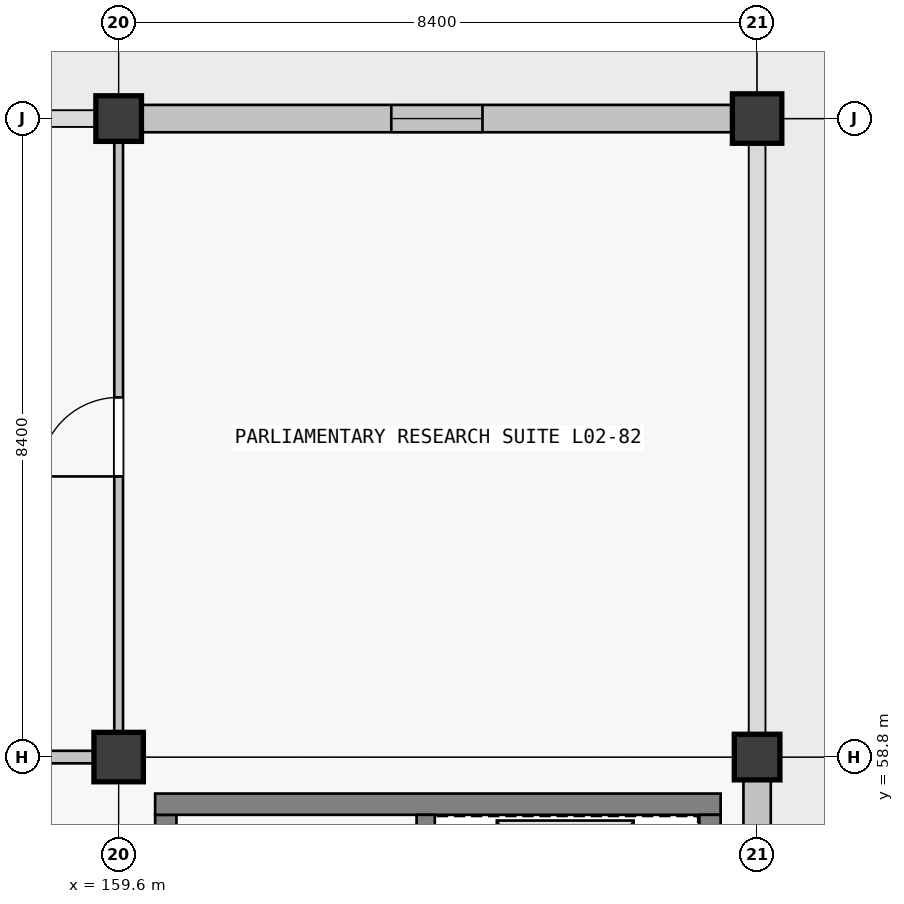
"""IFC4 building model, lengths in metres.
Left out: names, types, materials, properties, quantities, classifications, styles, units other than length and angle.
Written with IfcOpenShell. Run it as: python <this file> out.ifc"""

import sys

from ifc_helpers import new_model, si_unit, direction, frame, frame_2d, origin, origin_2d, place, context, subcontext, project, spatial, rectangle, extrude, element, fill, save


model = new_model("IFC4")
c1 = context("Model", 3, precision=1e-05, world=origin(), true_north=direction((0.0, 1.0)))
c2 = subcontext(c1, "Body", "Model", "MODEL_VIEW")
j1 = project(units=[si_unit("LENGTHUNIT", "METRE"), si_unit("PLANEANGLEUNIT", "RADIAN")], contexts=[c1])
p1 = place(None, origin())
s1 = spatial("IfcSite", under=j1, at=p1, CompositionType="ELEMENT")
p2 = place(p1, origin())
s2 = spatial("IfcBuilding", under=s1, at=p2, CompositionType="ELEMENT")
p3 = place(p2, frame((0.0, 0.0, 10.26)))
s3 = spatial("IfcBuildingStorey", under=s2, at=p3, CompositionType="ELEMENT", Elevation=10.26)
p4 = place(p3, frame((159.6, 58.8, 0.0), z_axis=(0.0, 0.0, 1.0), x_axis=(1.0, 0.0, 0.0)))
e1 = element("IfcColumn", 1, at=p4, inside=s3, PredefinedType="COLUMN", context=c2, shape_type="SweptSolid", body=[
    extrude(rectangle(XDim=0.65, YDim=0.65, at=origin_2d()), origin(), (0.0, 0.0, 1.0), 4.5),
])
for number, where, z_axis, x_axis in (
    (2, (159.6, 67.2, 0.0), (0.0, 0.0, 1.0), (1.0, 0.0, 0.0)),
    (3, (168.0, 58.8, 0.0), (0.0, 0.0, 1.0), (1.0, 0.0, 0.0)),
):
    element("IfcColumn", number, at=place(p3, frame(where, z_axis=z_axis, x_axis=x_axis)), inside=s3, PredefinedType="COLUMN", context=c2, shape_type="SweptSolid", body=[
        extrude(rectangle(XDim=0.6, YDim=0.6, at=origin_2d()), origin(), (0.0, 0.0, 1.0), 4.5),
    ])
p5 = place(p3, frame((168.0, 67.2, 0.0), z_axis=(0.0, 0.0, 1.0), x_axis=(1.0, 0.0, 0.0)))
e4 = element("IfcColumn", 4, at=p5, inside=s3, PredefinedType="COLUMN", context=c2, shape_type="SweptSolid", body=[
    extrude(rectangle(XDim=0.65, YDim=0.65, at=origin_2d()), origin(), (0.0, 0.0, 1.0), 4.5),
])
p6 = place(p3, frame((168.0, 58.499, 0.0), z_axis=(0.0, 0.0, 1.0), x_axis=(0.0, -1.0, 0.0)))
e5 = element("IfcWall", 5, at=p6, inside=s3, PredefinedType="SOLIDWALL", context=c2, shape_type="SweptSolid", body=[
    extrude(rectangle(XDim=7.773, YDim=0.36, at=frame_2d((3.886, 0.0))), origin(), (0.0, 0.0, 1.0), 3.54),
])
p7 = place(p3, frame((159.901, 67.2, 0.0), z_axis=(0.0, 0.0, 1.0), x_axis=(1.0, 0.0, 0.0)))
e6 = element("IfcWall", 6, at=p7, inside=s3, PredefinedType="SOLIDWALL", context=c2, shape_type="SweptSolid", body=[
    extrude(rectangle(XDim=7.773, YDim=0.36, at=frame_2d((3.887, 0.0))), origin(), (0.0, 0.0, 1.0), 3.54),
])
p8 = place(p7, frame((3.286, 0.0, 0.9)))
e7 = element("IfcOpeningElement", 7, at=p8, cuts=e6, PredefinedType="OPENING", context=c2, shape_type="SweptSolid", body=[
    extrude(rectangle(XDim=1.2, YDim=2.1, at=frame_2d((0.6, 1.05))), frame((0.0, 0.18, 0.0), z_axis=(0.0, -1.0, 0.0), x_axis=(1.0, 0.0, 0.0)), (0.0, 0.0, 1.0), 0.36),
])
p9 = place(p3, frame((160.22, 51.16, 0.0), z_axis=(0.0, 0.0, 1.0), x_axis=(0.0, 1.0, 0.0)))
e8 = element("IfcWall", 8, at=p9, inside=s3, PredefinedType="SHEAR", context=c2, shape_type="SweptSolid", body=[
    extrude(rectangle(XDim=6.88, YDim=0.28, at=frame_2d((3.44, 0.0))), origin(), (0.0, 0.0, 1.0), 4.5),
])
p10 = place(p3, frame((160.08, 58.18, 0.0), z_axis=(0.0, 0.0, 1.0), x_axis=(1.0, 0.0, 0.0)))
e9 = element("IfcWall", 9, at=p10, inside=s3, PredefinedType="SHEAR", context=c2, shape_type="SweptSolid", body=[
    extrude(rectangle(XDim=7.44, YDim=0.28, at=frame_2d((3.72, 0.0))), origin(), (0.0, 0.0, 1.0), 4.5),
])
p11 = place(p3, frame((167.38, 58.04, 0.0), z_axis=(0.0, 0.0, 1.0), x_axis=(0.0, -1.0, 0.0)))
e10 = element("IfcWall", 10, at=p11, inside=s3, PredefinedType="SHEAR", context=c2, shape_type="SweptSolid", body=[
    extrude(rectangle(XDim=6.88, YDim=0.28, at=frame_2d((3.44, 0.0))), origin(), (0.0, 0.0, 1.0), 4.5),
])
p12 = place(p3, frame((163.64, 51.16, 0.0), z_axis=(0.0, 0.0, 1.0), x_axis=(0.0, 1.0, 0.0)))
e11 = element("IfcWall", 11, at=p12, inside=s3, PredefinedType="SHEAR", context=c2, shape_type="SweptSolid", body=[
    extrude(rectangle(XDim=6.88, YDim=0.24, at=frame_2d((3.44, 0.0))), origin(), (0.0, 0.0, 1.0), 4.5),
])
p13 = place(p12, frame((0.12, 0.0, 0.0)))
e12 = element("IfcOpeningElement", 12, at=p13, cuts=e11, PredefinedType="OPENING", context=c2, shape_type="SweptSolid", body=[
    extrude(rectangle(XDim=1.0, YDim=2.15, at=frame_2d((0.5, 1.075))), frame((0.0, 0.12, 0.0), z_axis=(0.0, -1.0, 0.0), x_axis=(1.0, 0.0, 0.0)), (0.0, 0.0, 1.0), 0.24),
])
p14 = place(p3, frame((151.502, 58.8, 0.0), z_axis=(0.0, 0.0, 1.0), x_axis=(1.0, 0.0, 0.0)))
e13 = element("IfcWall", 13, at=p14, inside=s3, PredefinedType="PARTITIONING", context=c2, shape_type="SweptSolid", body=[
    extrude(rectangle(XDim=7.771, YDim=0.165, at=frame_2d((3.885, 0.0))), origin(), (0.0, 0.0, 1.0), 3.37),
])
p15 = place(p14, frame((3.415, 0.0, 0.0)))
e14 = element("IfcOpeningElement", 14, at=p15, cuts=e13, PredefinedType="OPENING", context=c2, shape_type="SweptSolid", body=[
    extrude(rectangle(XDim=0.94, YDim=2.15, at=frame_2d((0.47, 1.075))), frame((0.0, 0.083, 0.0), z_axis=(0.0, -1.0, 0.0), x_axis=(1.0, 0.0, 0.0)), (0.0, 0.0, 1.0), 0.165),
])
p16 = place(p3, frame((159.6, 59.127, 0.0), z_axis=(0.0, 0.0, 1.0), x_axis=(0.0, 1.0, 0.0)))
e15 = element("IfcWall", 15, at=p16, inside=s3, PredefinedType="PARTITIONING", context=c2, shape_type="SweptSolid", body=[
    extrude(rectangle(XDim=7.771, YDim=0.115, at=frame_2d((3.885, 0.0))), origin(), (0.0, 0.0, 1.0), 3.37),
])
p17 = place(p16, frame((3.365, 0.0, 0.0)))
e16 = element("IfcOpeningElement", 16, at=p17, cuts=e15, PredefinedType="OPENING", context=c2, shape_type="SweptSolid", body=[
    extrude(rectangle(XDim=1.04, YDim=2.2, at=frame_2d((0.52, 1.1))), frame((0.0, 0.058, 0.0), z_axis=(0.0, -1.0, 0.0), x_axis=(1.0, 0.0, 0.0)), (0.0, 0.0, 1.0), 0.115),
])
p18 = place(p8, origin())
e17 = element("IfcWindow", 17, at=p18, inside=s3, PartitioningType="SINGLE_PANEL", PredefinedType="WINDOW", context=c2, shape_type="SweptSolid", body=[
    extrude(rectangle(XDim=1.2, YDim=2.1, at=frame_2d((0.6, 1.05))), frame((0.0, 0.03, 0.0), z_axis=(0.0, -1.0, 0.0), x_axis=(1.0, 0.0, 0.0)), (0.0, 0.0, 1.0), 0.06),
])
fill(e7, e17)
p19 = place(p17, origin())
e18 = element("IfcDoor", 18, at=p19, inside=s3, OperationType="SINGLE_SWING_LEFT", PredefinedType="DOOR", context=c2, shape_type="SweptSolid", body=[
    extrude(rectangle(XDim=1.04, YDim=2.2, at=frame_2d((0.52, 1.1))), frame((0.0, 0.025, 0.0), z_axis=(0.0, -1.0, 0.0), x_axis=(1.0, 0.0, 0.0)), (0.0, 0.0, 1.0), 0.05),
])
fill(e16, e18)
save(model, sys.argv[1])
